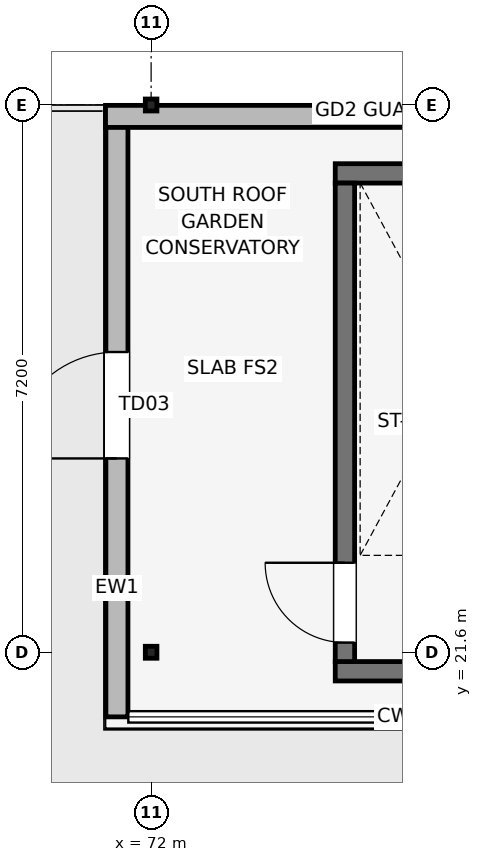
"""IFC4 building model, lengths in metres.
Left out: names, types, materials, properties, quantities, classifications, styles, units other than length and angle.
Written with IfcOpenShell. Run it as: python <this file> out.ifc"""

import sys

from ifc_helpers import new_model, si_unit, direction, frame, frame_2d, origin, origin_2d, place, context, subcontext, project, spatial, rectangle, i_section, extrude, element, fill, save


model = new_model("IFC4")
c1 = context("Model", 3, precision=1e-05, world=origin(), true_north=direction((0.0, 1.0)))
c2 = subcontext(c1, "Body", "Model", "MODEL_VIEW")
j1 = project(units=[si_unit("LENGTHUNIT", "METRE"), si_unit("PLANEANGLEUNIT", "RADIAN")], contexts=[c1])
p1 = place(None, origin())
s1 = spatial("IfcSite", under=j1, at=p1, CompositionType="ELEMENT")
p2 = place(p1, origin())
s2 = spatial("IfcBuilding", under=s1, at=p2, CompositionType="ELEMENT")
p3 = place(p2, frame((0.0, 0.0, 8.7)))
s3 = spatial("IfcBuildingStorey", under=s2, at=p3, CompositionType="ELEMENT", Elevation=8.7)
for number, where, z_axis, x_axis in (
    (1, (72.0, 21.6, 0.0), (0.0, 0.0, 1.0), (1.0, 0.0, 0.0)),
    (2, (72.0, 28.8, 0.0), (0.0, 0.0, 1.0), (1.0, 0.0, 0.0)),
):
    element("IfcColumn", number, at=place(p3, frame(where, z_axis=z_axis, x_axis=x_axis)), inside=s3, PredefinedType="COLUMN", context=c2, shape_type="SweptSolid", body=[
        extrude(i_section(OverallWidth=0.153, OverallDepth=0.157, WebThickness=0.007, FlangeThickness=0.01, FilletRadius=0.009, at=origin_2d()), origin(), (0.0, 0.0, 1.0), 3.15),
    ])
for number, where, z_axis, x_axis in (
    (3, (74.423, 21.35, 0.0), (0.0, 0.0, 1.0), (1.0, 0.0, 0.0)),
    (4, (74.423, 27.9, 0.0), (0.0, 0.0, 1.0), (1.0, 0.0, 0.0)),
):
    element("IfcWall", number, at=place(p3, frame(where, z_axis=z_axis, x_axis=x_axis)), inside=s3, PredefinedType="SHEAR", context=c2, shape_type="SweptSolid", body=[
        extrude(rectangle(XDim=3.305, YDim=0.255, at=frame_2d((1.652, 0.0))), origin(), (0.0, 0.0, 1.0), 3.15),
    ])
p4 = place(p3, frame((74.55, 21.478, 0.0), z_axis=(0.0, 0.0, 1.0), x_axis=(0.0, 1.0, 0.0)))
e5 = element("IfcWall", 5, at=p4, inside=s3, PredefinedType="SHEAR", context=c2, shape_type="SweptSolid", body=[
    extrude(rectangle(XDim=6.295, YDim=0.255, at=frame_2d((3.147, 0.0))), origin(), (0.0, 0.0, 1.0), 3.15),
])
p5 = place(p4, frame((0.25, 0.0, 0.0)))
e6 = element("IfcOpeningElement", 6, at=p5, cuts=e5, PredefinedType="OPENING", context=c2, shape_type="SweptSolid", body=[
    extrude(rectangle(XDim=1.05, YDim=2.12, at=frame_2d((0.525, 1.06))), frame((0.0, 0.137, 0.0), z_axis=(0.0, -1.0, 0.0), x_axis=(1.0, 0.0, 0.0)), (0.0, 0.0, 1.0), 0.275),
])
p6 = place(p3, frame((71.55, 20.75, 0.0), z_axis=(0.0, 0.0, 1.0), x_axis=(0.0, 1.0, 0.0)))
e7 = element("IfcWall", 7, at=p6, inside=s3, PredefinedType="SOLIDWALL", context=c2, shape_type="SweptSolid", body=[
    extrude(rectangle(XDim=7.9, YDim=0.29, at=frame_2d((3.95, 0.0))), origin(), (0.0, 0.0, 1.0), 3.15),
])
p7 = place(p6, frame((3.4, 0.0, 0.0)))
e8 = element("IfcOpeningElement", 8, at=p7, cuts=e7, PredefinedType="OPENING", context=c2, shape_type="SweptSolid", body=[
    extrude(rectangle(XDim=1.4, YDim=2.2, at=frame_2d((0.7, 1.1))), frame((0.0, 0.155, 0.0), z_axis=(0.0, -1.0, 0.0), x_axis=(1.0, 0.0, 0.0)), (0.0, 0.0, 1.0), 0.31),
])
p8 = place(p3, frame((71.4, 28.65, 0.0), z_axis=(0.0, 0.0, 1.0), x_axis=(1.0, 0.0, 0.0)))
e9 = element("IfcWall", 9, at=p8, inside=s3, PredefinedType="SOLIDWALL", context=c2, shape_type="SweptSolid", body=[
    extrude(rectangle(XDim=7.8, YDim=0.29, at=frame_2d((3.9, 0.0))), origin(), (0.0, 0.0, 1.0), 3.15),
])
p9 = place(p7, origin())
e10 = element("IfcDoor", 10, at=p9, inside=s3, OperationType="SINGLE_SWING_LEFT", PredefinedType="DOOR", context=c2, shape_type="SweptSolid", body=[
    extrude(rectangle(XDim=1.4, YDim=2.2, at=frame_2d((0.7, 1.1))), frame((0.0, 0.025, 0.0), z_axis=(0.0, -1.0, 0.0), x_axis=(1.0, 0.0, 0.0)), (0.0, 0.0, 1.0), 0.05),
])
fill(e8, e10)
p10 = place(p5, origin())
e11 = element("IfcDoor", 11, at=p10, inside=s3, OperationType="SINGLE_SWING_RIGHT", PredefinedType="DOOR", context=c2, shape_type="SweptSolid", body=[
    extrude(rectangle(XDim=1.05, YDim=2.12, at=frame_2d((0.525, 1.06))), frame((0.0, 0.025, 0.0), z_axis=(0.0, -1.0, 0.0), x_axis=(1.0, 0.0, 0.0)), (0.0, 0.0, 1.0), 0.05),
])
fill(e6, e11)
save(model, sys.argv[1])
